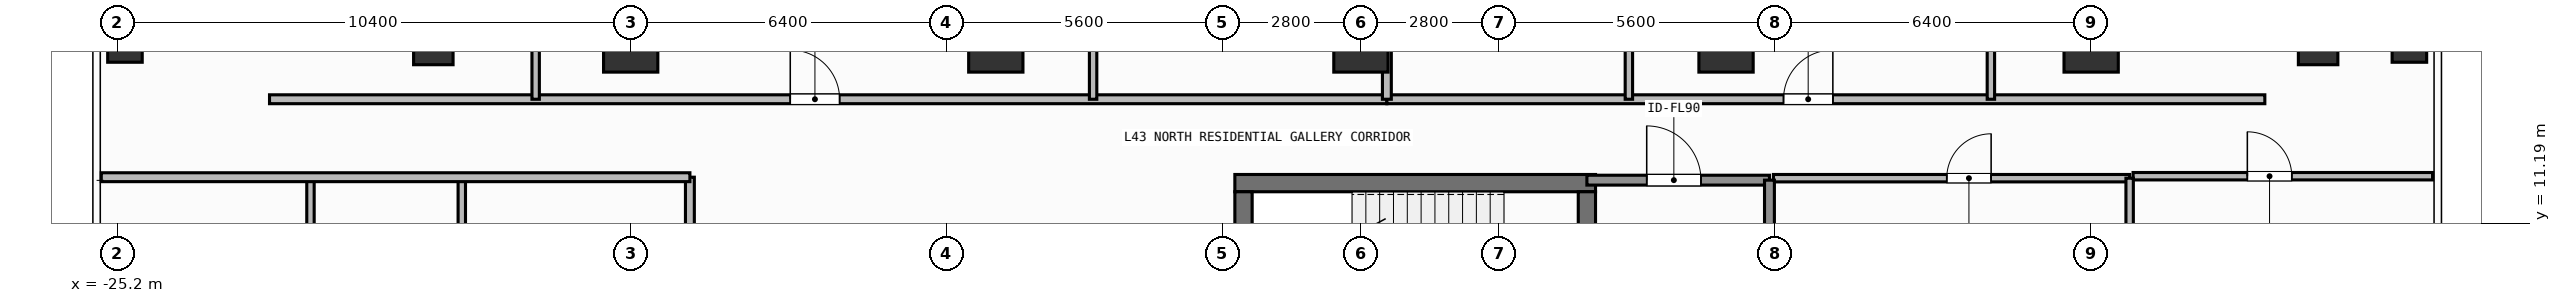
"""IFC4 building model, lengths in metres.
Left out: names, types, materials, properties, quantities, classifications, styles, units other than length and angle.
Written with IfcOpenShell. Run it as: python <this file> out.ifc"""

import sys

from ifc_helpers import new_model, si_unit, direction, frame, frame_2d, origin, origin_2d, place, context, subcontext, project, spatial, rectangle, hollow_rectangle, extrude, element, fill, save


model = new_model("IFC4")
c1 = context("Model", 3, precision=1e-05, world=origin(), true_north=direction((0.0, 1.0)))
c2 = subcontext(c1, "Body", "Model", "MODEL_VIEW")
j1 = project(units=[si_unit("LENGTHUNIT", "METRE"), si_unit("PLANEANGLEUNIT", "RADIAN")], contexts=[c1])
p1 = place(None, origin())
s1 = spatial("IfcSite", under=j1, at=p1, CompositionType="ELEMENT")
p2 = place(p1, origin())
s2 = spatial("IfcBuilding", under=s1, at=p2, CompositionType="ELEMENT")
p3 = place(p2, frame((0.0, 0.0, 175.8)))
s3 = spatial("IfcBuildingStorey", under=s2, at=p3, CompositionType="ELEMENT", Elevation=175.8)
p4 = place(p3, frame((-2.555, 12.0, 0.0), z_axis=(0.0, 0.0, 1.0), x_axis=(1.0, 0.0, 0.0)))
e1 = element("IfcWall", 1, at=p4, inside=s3, PredefinedType="SHEAR", context=c2, shape_type="SweptSolid", body=[
    extrude(rectangle(XDim=7.31, YDim=0.35, at=frame_2d((3.655, 0.0))), origin(), (0.0, 0.0, 1.0), 3.9),
])
p5 = place(p3, frame((-2.38, 8.9, 0.0), z_axis=(0.0, 0.0, 1.0), x_axis=(0.0, 1.0, 0.0)))
e2 = element("IfcWall", 2, at=p5, inside=s3, PredefinedType="SHEAR", context=c2, shape_type="SweptSolid", body=[
    extrude(rectangle(XDim=2.925, YDim=0.35, at=frame_2d((1.462, 0.0))), origin(), (0.0, 0.0, 1.0), 3.9),
])
p6 = place(p3, frame((4.58, 11.825, 0.0), z_axis=(0.0, 0.0, 1.0), x_axis=(0.0, -1.0, 0.0)))
e3 = element("IfcWall", 3, at=p6, inside=s3, PredefinedType="SHEAR", context=c2, shape_type="SweptSolid", body=[
    extrude(rectangle(XDim=2.925, YDim=0.35, at=frame_2d((1.462, 0.0))), origin(), (0.0, 0.0, 1.0), 3.9),
])
p7 = place(p6, frame((0.913, 0.0, 0.0)))
e4 = element("IfcOpeningElement", 4, at=p7, cuts=e3, PredefinedType="OPENING", context=c2, shape_type="SweptSolid", body=[
    extrude(rectangle(XDim=1.1, YDim=2.15, at=frame_2d((0.55, 1.075))), frame((0.0, 0.185, 0.0), z_axis=(0.0, -1.0, 0.0), x_axis=(1.0, 0.0, 0.0)), (0.0, 0.0, 1.0), 0.37),
])
for number, where, z_axis, x_axis in (
    (5, (-14.8, 14.8, 0.0), (0.0, 0.0, 1.0), (1.0, 0.0, 0.0)),
    (6, (-7.4, 14.8, 0.0), (0.0, 0.0, 1.0), (1.0, 0.0, 0.0)),
    (7, (0.0, 14.8, 0.0), (0.0, 0.0, 1.0), (1.0, 0.0, 0.0)),
    (8, (7.4, 14.8, 0.0), (0.0, 0.0, 1.0), (1.0, 0.0, 0.0)),
    (9, (14.8, 14.8, 0.0), (0.0, 0.0, 1.0), (1.0, 0.0, 0.0)),
):
    element("IfcColumn", number, at=place(p3, frame(where, z_axis=z_axis, x_axis=x_axis)), inside=s3, PredefinedType="COLUMN", context=c2, shape_type="SweptSolid", body=[
        extrude(rectangle(XDim=1.1, YDim=1.1, at=origin_2d()), origin(), (0.0, 0.0, 1.0), 3.9),
    ])
for number, where, z_axis, x_axis in (
    (10, (-18.8, 14.8, 0.0), (0.0, 0.0, 1.0), (1.0, 0.0, 0.0)),
    (11, (19.4, 14.8, 0.0), (0.0, 0.0, 1.0), (1.0, 0.0, 0.0)),
):
    element("IfcColumn", number, at=place(p3, frame(where, z_axis=z_axis, x_axis=x_axis)), inside=s3, PredefinedType="COLUMN", context=c2, shape_type="SweptSolid", body=[
        extrude(hollow_rectangle(XDim=0.8, YDim=0.8, WallThickness=0.036, at=origin_2d()), origin(), (0.0, 0.0, 1.0), 3.9),
    ])
for number, where, z_axis, x_axis in (
    (12, (-25.05, 14.8, 0.0), (0.0, 0.0, 1.0), (1.0, 0.0, 0.0)),
    (13, (21.25, 14.8, 0.0), (0.0, 0.0, 1.0), (1.0, 0.0, 0.0)),
):
    element("IfcColumn", number, at=place(p3, frame(where, z_axis=z_axis, x_axis=x_axis)), inside=s3, PredefinedType="COLUMN", context=c2, shape_type="SweptSolid", body=[
        extrude(hollow_rectangle(XDim=0.7, YDim=0.7, WallThickness=0.032, at=origin_2d()), origin(), (0.0, 0.0, 1.0), 3.9),
    ])
p8 = place(p3, frame((4.58, 12.06, 0.0), z_axis=(0.0, 0.0, 1.0), x_axis=(1.0, 0.0, 0.0)))
e14 = element("IfcWall", 14, at=p8, inside=s3, PredefinedType="SOLIDWALL", context=c2, shape_type="SweptSolid", body=[
    extrude(rectangle(XDim=3.7, YDim=0.2, at=frame_2d((1.85, 0.0))), origin(), (0.0, 0.0, 1.0), 3.68),
])
p9 = place(p8, frame((1.212, 0.0, 0.0)))
e15 = element("IfcOpeningElement", 15, at=p9, cuts=e14, PredefinedType="OPENING", context=c2, shape_type="SweptSolid", body=[
    extrude(rectangle(XDim=1.1, YDim=2.15, at=frame_2d((0.55, 1.075))), frame((0.0, 0.11, 0.0), z_axis=(0.0, -1.0, 0.0), x_axis=(1.0, 0.0, 0.0)), (0.0, 0.0, 1.0), 0.22),
])
p10 = place(p3, frame((8.36, 12.1, 0.0), z_axis=(0.0, 0.0, 1.0), x_axis=(1.0, 0.0, 0.0)))
e16 = element("IfcWall", 16, at=p10, inside=s3, PredefinedType="PARTITIONING", context=c2, shape_type="SweptSolid", body=[
    extrude(rectangle(XDim=7.22, YDim=0.15, at=frame_2d((3.61, 0.0))), origin(), (0.0, 0.0, 1.0), 3.68),
])
p11 = place(p10, frame((3.513, 0.0, 0.0)))
e17 = element("IfcOpeningElement", 17, at=p11, cuts=e16, PredefinedType="OPENING", context=c2, shape_type="SweptSolid", body=[
    extrude(rectangle(XDim=0.9, YDim=2.1, at=frame_2d((0.45, 1.05))), frame((0.0, 0.085, 0.0), z_axis=(0.0, -1.0, 0.0), x_axis=(1.0, 0.0, 0.0)), (0.0, 0.0, 1.0), 0.17),
])
p12 = place(p3, frame((-22.12, 13.7, 0.0), z_axis=(0.0, 0.0, 1.0), x_axis=(1.0, 0.0, 0.0)))
e18 = element("IfcWall", 18, at=p12, inside=s3, PredefinedType="PARTITIONING", context=c2, shape_type="SweptSolid", body=[
    extrude(rectangle(XDim=22.646, YDim=0.18, at=frame_2d((11.323, 0.0))), origin(), (0.0, 0.0, 1.0), 3.68),
])
p13 = place(p12, frame((10.554, 0.0, 0.0)))
e19 = element("IfcOpeningElement", 19, at=p13, cuts=e18, PredefinedType="OPENING", context=c2, shape_type="SweptSolid", body=[
    extrude(rectangle(XDim=1.0, YDim=2.2, at=frame_2d((0.5, 1.1))), frame((0.0, 0.1, 0.0), z_axis=(0.0, -1.0, 0.0), x_axis=(1.0, 0.0, 0.0)), (0.0, 0.0, 1.0), 0.2),
])
p14 = place(p3, frame((-16.726, 13.7, 0.0), z_axis=(0.0, 0.0, 1.0), x_axis=(0.0, 1.0, 0.0)))
e20 = element("IfcWall", 20, at=p14, inside=s3, PredefinedType="PARTITIONING", context=c2, shape_type="SweptSolid", body=[
    extrude(rectangle(XDim=5.934, YDim=0.15, at=frame_2d((2.967, 0.0))), origin(), (0.0, 0.0, 1.0), 3.68),
])
p15 = place(p14, frame((2.63, 0.0, 0.0)))
e21 = element("IfcOpeningElement", 21, at=p15, cuts=e20, PredefinedType="OPENING", context=c2, shape_type="SweptSolid", body=[
    extrude(rectangle(XDim=0.85, YDim=2.1, at=frame_2d((0.425, 1.05))), frame((0.0, 0.085, 0.0), z_axis=(0.0, -1.0, 0.0), x_axis=(1.0, 0.0, 0.0)), (0.0, 0.0, 1.0), 0.17),
])
p16 = place(p3, frame((-5.428, 13.7, 0.0), z_axis=(0.0, 0.0, 1.0), x_axis=(0.0, 1.0, 0.0)))
e22 = element("IfcWall", 22, at=p16, inside=s3, PredefinedType="PARTITIONING", context=c2, shape_type="SweptSolid", body=[
    extrude(rectangle(XDim=4.154, YDim=0.15, at=frame_2d((2.077, 0.0))), origin(), (0.0, 0.0, 1.0), 3.68),
])
p17 = place(p16, frame((1.74, 0.0, 0.0)))
e23 = element("IfcOpeningElement", 23, at=p17, cuts=e22, PredefinedType="OPENING", context=c2, shape_type="SweptSolid", body=[
    extrude(rectangle(XDim=0.85, YDim=2.1, at=frame_2d((0.425, 1.05))), frame((0.0, 0.085, 0.0), z_axis=(0.0, -1.0, 0.0), x_axis=(1.0, 0.0, 0.0)), (0.0, 0.0, 1.0), 0.17),
])
p18 = place(p3, frame((0.526, 13.7, 0.0), z_axis=(0.0, 0.0, 1.0), x_axis=(1.0, 0.0, 0.0)))
e24 = element("IfcWall", 24, at=p18, inside=s3, PredefinedType="PARTITIONING", context=c2, shape_type="SweptSolid", body=[
    extrude(rectangle(XDim=17.794, YDim=0.18, at=frame_2d((8.897, 0.0))), origin(), (0.0, 0.0, 1.0), 3.68),
])
p19 = place(p18, frame((8.039, 0.0, 0.0)))
e25 = element("IfcOpeningElement", 25, at=p19, cuts=e24, PredefinedType="OPENING", context=c2, shape_type="SweptSolid", body=[
    extrude(rectangle(XDim=1.0, YDim=2.2, at=frame_2d((0.5, 1.1))), frame((0.0, 0.1, 0.0), z_axis=(0.0, -1.0, 0.0), x_axis=(1.0, 0.0, 0.0)), (0.0, 0.0, 1.0), 0.2),
])
p20 = place(p3, frame((5.431, 13.7, 0.0), z_axis=(0.0, 0.0, 1.0), x_axis=(0.0, 1.0, 0.0)))
e26 = element("IfcWall", 26, at=p20, inside=s3, PredefinedType="PARTITIONING", context=c2, shape_type="SweptSolid", body=[
    extrude(rectangle(XDim=5.69, YDim=0.15, at=frame_2d((2.845, 0.0))), origin(), (0.0, 0.0, 1.0), 3.68),
])
p21 = place(p20, frame((2.42, 0.0, 0.0)))
e27 = element("IfcOpeningElement", 27, at=p21, cuts=e26, PredefinedType="OPENING", context=c2, shape_type="SweptSolid", body=[
    extrude(rectangle(XDim=0.85, YDim=2.1, at=frame_2d((0.425, 1.05))), frame((0.0, 0.085, 0.0), z_axis=(0.0, -1.0, 0.0), x_axis=(1.0, 0.0, 0.0)), (0.0, 0.0, 1.0), 0.17),
])
p22 = place(p3, frame((12.768, 13.7, 0.0), z_axis=(0.0, 0.0, 1.0), x_axis=(0.0, 1.0, 0.0)))
e28 = element("IfcWall", 28, at=p22, inside=s3, PredefinedType="PARTITIONING", context=c2, shape_type="SweptSolid", body=[
    extrude(rectangle(XDim=3.983, YDim=0.15, at=frame_2d((1.992, 0.0))), origin(), (0.0, 0.0, 1.0), 3.68),
])
p23 = place(p22, frame((1.566, 0.0, 0.0)))
e29 = element("IfcOpeningElement", 29, at=p23, cuts=e28, PredefinedType="OPENING", context=c2, shape_type="SweptSolid", body=[
    extrude(rectangle(XDim=0.85, YDim=2.1, at=frame_2d((0.425, 1.05))), frame((0.0, 0.085, 0.0), z_axis=(0.0, -1.0, 0.0), x_axis=(1.0, 0.0, 0.0)), (0.0, 0.0, 1.0), 0.17),
])
p24 = place(p3, frame((-13.6, -12.12, 0.0), z_axis=(0.0, 0.0, 1.0), x_axis=(0.0, 1.0, 0.0)))
e30 = element("IfcWall", 30, at=p24, inside=s3, PredefinedType="PARTITIONING", context=c2, shape_type="SweptSolid", body=[
    extrude(rectangle(XDim=24.24, YDim=0.18, at=frame_2d((12.12, 0.0))), origin(), (0.0, 0.0, 1.0), 3.68),
])
p25 = place(p24, frame((11.62, 0.0, 0.0)))
e31 = element("IfcOpeningElement", 31, at=p25, cuts=e30, PredefinedType="OPENING", context=c2, shape_type="SweptSolid", body=[
    extrude(rectangle(XDim=1.0, YDim=2.2, at=frame_2d((0.5, 1.1))), frame((0.0, 0.1, 0.0), z_axis=(0.0, -1.0, 0.0), x_axis=(1.0, 0.0, 0.0)), (0.0, 0.0, 1.0), 0.2),
])
p26 = place(p3, frame((15.65, 12.14, 0.0), z_axis=(0.0, 0.0, 1.0), x_axis=(1.0, 0.0, 0.0)))
e32 = element("IfcWall", 32, at=p26, inside=s3, PredefinedType="PARTITIONING", context=c2, shape_type="SweptSolid", body=[
    extrude(rectangle(XDim=6.07, YDim=0.15, at=frame_2d((3.035, 0.0))), origin(), (0.0, 0.0, 1.0), 3.68),
])
p27 = place(p26, frame((2.316, 0.0, 0.0)))
e33 = element("IfcOpeningElement", 33, at=p27, cuts=e32, PredefinedType="OPENING", context=c2, shape_type="SweptSolid", body=[
    extrude(rectangle(XDim=0.9, YDim=2.1, at=frame_2d((0.45, 1.05))), frame((0.0, 0.085, 0.0), z_axis=(0.0, -1.0, 0.0), x_axis=(1.0, 0.0, 0.0)), (0.0, 0.0, 1.0), 0.17),
])
p28 = place(p3, frame((8.28, 8.8, 0.0), z_axis=(0.0, 0.0, 1.0), x_axis=(0.0, 1.0, 0.0)))
e34 = element("IfcWall", 34, at=p28, inside=s3, PredefinedType="SOLIDWALL", context=c2, shape_type="SweptSolid", body=[
    extrude(rectangle(XDim=3.26, YDim=0.2, at=frame_2d((1.63, 0.0))), origin(), (0.0, 0.0, 1.0), 3.68),
])
p29 = place(p3, frame((15.58, 5.85, 0.0), z_axis=(0.0, 0.0, 1.0), x_axis=(0.0, 1.0, 0.0)))
e35 = element("IfcWall", 35, at=p29, inside=s3, PredefinedType="PARTITIONING", context=c2, shape_type="SweptSolid", body=[
    extrude(rectangle(XDim=6.25, YDim=0.15, at=frame_2d((3.125, 0.0))), origin(), (0.0, 0.0, 1.0), 3.68),
])
p30 = place(p3, frame((0.526, 13.7, 0.0), z_axis=(0.0, 0.0, 1.0), x_axis=(0.0, 1.0, 0.0)))
e36 = element("IfcWall", 36, at=p30, inside=s3, PredefinedType="PARTITIONING", context=c2, shape_type="SweptSolid", body=[
    extrude(rectangle(XDim=9.93, YDim=0.18, at=frame_2d((4.965, 0.0))), origin(), (0.0, 0.0, 1.0), 3.68),
])
for number, where, z_axis, x_axis in (
    (37, (-18.223, 5.436, 0.0), (0.0, 0.0, 1.0), (0.0, 1.0, 0.0)),
    (38, (-21.29, 5.436, 0.0), (0.0, 0.0, 1.0), (0.0, 1.0, 0.0)),
):
    element("IfcWall", number, at=place(p3, frame(where, z_axis=z_axis, x_axis=x_axis)), inside=s3, PredefinedType="PARTITIONING", context=c2, shape_type="SweptSolid", body=[
        extrude(rectangle(XDim=6.684, YDim=0.15, at=frame_2d((3.342, 0.0))), origin(), (0.0, 0.0, 1.0), 3.68),
    ])
p31 = place(p3, frame((-25.53, 12.12, 0.0), z_axis=(0.0, 0.0, 1.0), x_axis=(1.0, 0.0, 0.0)))
e39 = element("IfcWall", 39, at=p31, inside=s3, PredefinedType="PARTITIONING", context=c2, shape_type="SweptSolid", body=[
    extrude(rectangle(XDim=11.93, YDim=0.18, at=frame_2d((5.965, 0.0))), origin(), (0.0, 0.0, 1.0), 3.68),
])
p32 = place(p9, origin())
e40 = element("IfcDoor", 40, at=p32, inside=s3, OperationType="SINGLE_SWING_LEFT", PredefinedType="DOOR", context=c2, shape_type="SweptSolid", body=[
    extrude(rectangle(XDim=1.1, YDim=2.15, at=frame_2d((0.55, 1.075))), frame((0.0, 0.025, 0.0), z_axis=(0.0, -1.0, 0.0), x_axis=(1.0, 0.0, 0.0)), (0.0, 0.0, 1.0), 0.05),
])
fill(e15, e40)
p33 = place(p11, origin())
e41 = element("IfcDoor", 41, at=p33, inside=s3, OperationType="SINGLE_SWING_RIGHT", PredefinedType="DOOR", context=c2, shape_type="SweptSolid", body=[
    extrude(rectangle(XDim=0.9, YDim=2.1, at=frame_2d((0.45, 1.05))), frame((0.0, 0.025, 0.0), z_axis=(0.0, -1.0, 0.0), x_axis=(1.0, 0.0, 0.0)), (0.0, 0.0, 1.0), 0.05),
])
fill(e17, e41)
p34 = place(p13, origin())
e42 = element("IfcDoor", 42, at=p34, inside=s3, OperationType="SINGLE_SWING_LEFT", PredefinedType="DOOR", context=c2, shape_type="SweptSolid", body=[
    extrude(rectangle(XDim=1.0, YDim=2.2, at=frame_2d((0.5, 1.1))), frame((0.0, 0.025, 0.0), z_axis=(0.0, -1.0, 0.0), x_axis=(1.0, 0.0, 0.0)), (0.0, 0.0, 1.0), 0.05),
])
fill(e19, e42)
p35 = place(p19, origin())
e43 = element("IfcDoor", 43, at=p35, inside=s3, OperationType="SINGLE_SWING_RIGHT", PredefinedType="DOOR", context=c2, shape_type="SweptSolid", body=[
    extrude(rectangle(XDim=1.0, YDim=2.2, at=frame_2d((0.5, 1.1))), frame((0.0, 0.025, 0.0), z_axis=(0.0, -1.0, 0.0), x_axis=(1.0, 0.0, 0.0)), (0.0, 0.0, 1.0), 0.05),
])
fill(e25, e43)
p36 = place(p27, origin())
e44 = element("IfcDoor", 44, at=p36, inside=s3, OperationType="SINGLE_SWING_LEFT", PredefinedType="DOOR", context=c2, shape_type="SweptSolid", body=[
    extrude(rectangle(XDim=0.9, YDim=2.1, at=frame_2d((0.45, 1.05))), frame((0.0, 0.025, 0.0), z_axis=(0.0, -1.0, 0.0), x_axis=(1.0, 0.0, 0.0)), (0.0, 0.0, 1.0), 0.05),
])
fill(e33, e44)
save(model, sys.argv[1])
